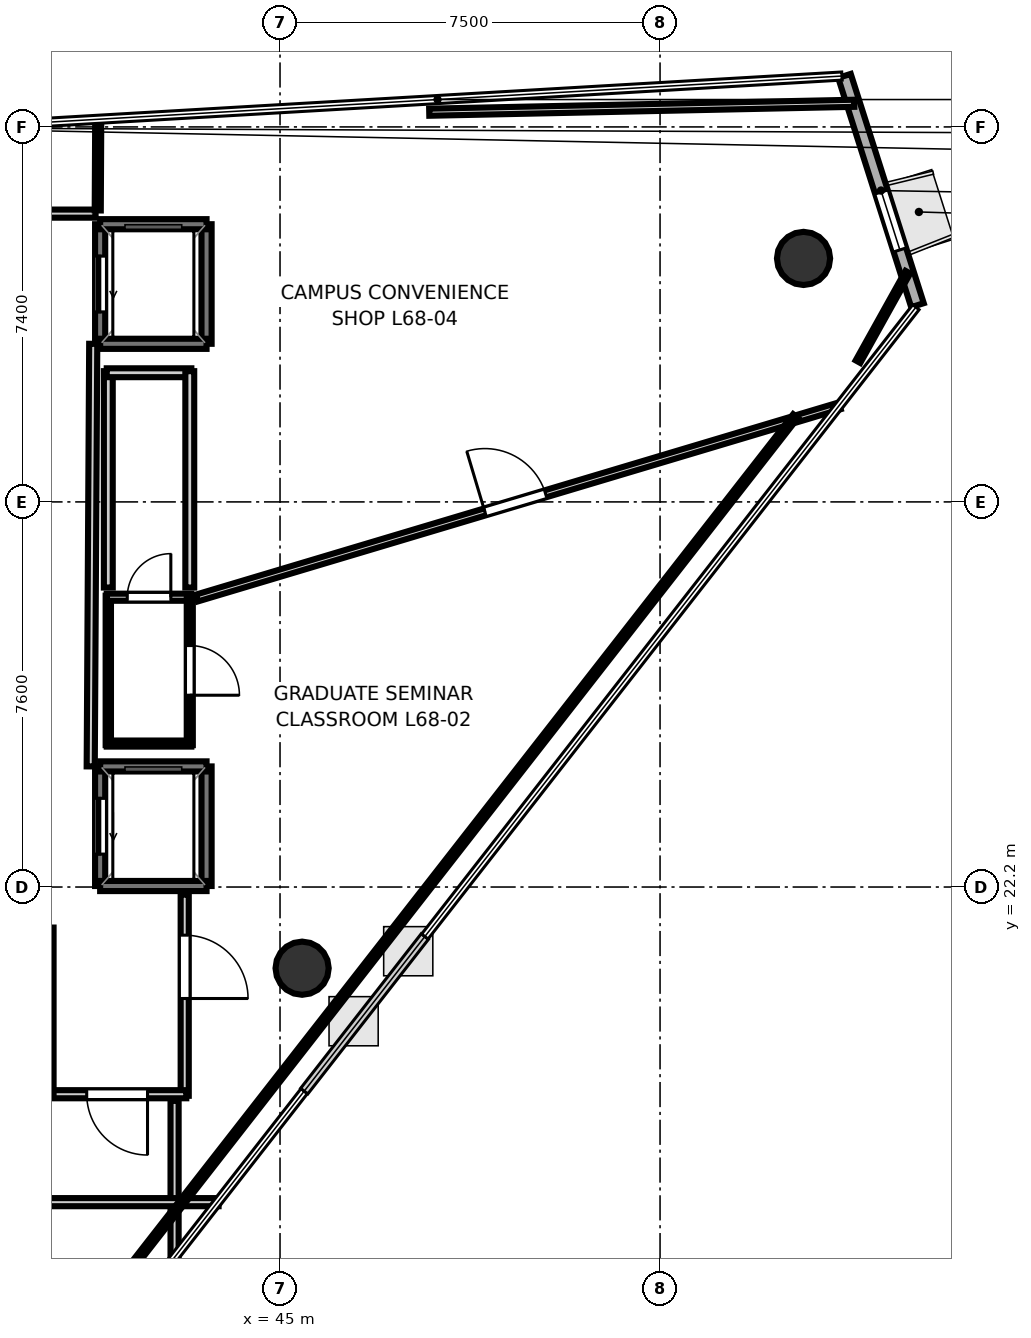
"""IFC4 building model, lengths in metres.
Left out: names, types, materials, properties, quantities, classifications, styles, units other than length and angle.
Written with IfcOpenShell. Run it as: python <this file> out.ifc"""

import sys

from ifc_helpers import new_model, si_unit, direction, frame, frame_2d, origin, origin_2d, place, context, subcontext, project, spatial, rectangle, hollow_circle, extrude, element, fill, save


model = new_model("IFC4")
c1 = context("Model", 3, precision=1e-05, world=origin(), true_north=direction((0.0, 1.0)))
c2 = subcontext(c1, "Body", "Model", "MODEL_VIEW")
j1 = project(units=[si_unit("LENGTHUNIT", "METRE"), si_unit("PLANEANGLEUNIT", "RADIAN")], contexts=[c1])
p1 = place(None, origin())
s1 = spatial("IfcSite", under=j1, at=p1, CompositionType="ELEMENT")
p2 = place(p1, origin())
s2 = spatial("IfcBuilding", under=s1, at=p2, CompositionType="ELEMENT")
p3 = place(p2, frame((0.0, 0.0, 264.9)))
s3 = spatial("IfcBuildingStorey", under=s2, at=p3, CompositionType="ELEMENT", Elevation=264.9)
for number, where, z_axis, x_axis in (
    (1, (55.332, 34.605, 0.0), (0.0, 0.0, 1.0), (1.0, 0.0, 0.0)),
    (2, (45.436, 20.598, 0.0), (0.0, 0.0, 1.0), (1.0, 0.0, 0.0)),
):
    element("IfcColumn", number, at=place(p3, frame(where, z_axis=z_axis, x_axis=x_axis)), inside=s3, PredefinedType="COLUMN", context=c2, shape_type="SweptSolid", body=[
        extrude(hollow_circle(Radius=0.525, WallThickness=0.028, at=origin_2d()), origin(), (0.0, 0.0, 1.0), 3.7),
    ])
p4 = place(p3, frame((57.581, 33.682, 0.0), z_axis=(0.0, 0.0, 1.0), x_axis=(-0.303320364909, 0.952888637896, 0.0)))
e3 = element("IfcWall", 3, at=p4, inside=s3, PredefinedType="SOLIDWALL", context=c2, shape_type="SweptSolid", body=[
    extrude(rectangle(XDim=4.749, YDim=0.26, at=frame_2d((2.375, 0.0))), origin(), (0.0, 0.0, 1.0), 3.52),
])
p5 = place(p4, frame((1.145, 0.0, 0.9)))
e4 = element("IfcOpeningElement", 4, at=p5, cuts=e3, PredefinedType="OPENING", context=c2, shape_type="SweptSolid", body=[
    extrude(rectangle(XDim=1.2, YDim=2.0, at=frame_2d((0.6, 1.0))), frame((0.0, 0.14, 0.0), z_axis=(0.0, -1.0, 0.0), x_axis=(1.0, 0.0, 0.0)), (0.0, 0.0, 1.0), 0.28),
])
p6 = place(p3, frame((43.55, 22.22, 0.0), z_axis=(0.0, 0.0, 1.0), x_axis=(0.0, 1.0, 0.0)))
e5 = element("IfcWall", 5, at=p6, inside=s3, PredefinedType="SOLIDWALL", context=c2, shape_type="SweptSolid", body=[
    extrude(rectangle(XDim=2.36, YDim=0.2, at=frame_2d((1.18, 0.0))), origin(), (0.0, 0.0, 1.0), 3.52),
])
p7 = place(p3, frame((41.45, 22.22, 0.0), z_axis=(0.0, 0.0, 1.0), x_axis=(0.0, 1.0, 0.0)))
e6 = element("IfcWall", 6, at=p7, inside=s3, PredefinedType="SOLIDWALL", context=c2, shape_type="SweptSolid", body=[
    extrude(rectangle(XDim=2.36, YDim=0.2, at=frame_2d((1.18, 0.0))), origin(), (0.0, 0.0, 1.0), 3.52),
])
p8 = place(p7, frame((0.63, 0.0, 0.0)))
e7 = element("IfcOpeningElement", 7, at=p8, cuts=e6, PredefinedType="OPENING", context=c2, shape_type="SweptSolid", body=[
    extrude(rectangle(XDim=1.1, YDim=2.15, at=frame_2d((0.55, 1.075))), frame((0.0, 0.11, 0.0), z_axis=(0.0, -1.0, 0.0), x_axis=(1.0, 0.0, 0.0)), (0.0, 0.0, 1.0), 0.22),
])
for number, where, z_axis, x_axis in (
    (8, (41.45, 24.58, 0.0), (0.0, 0.0, 1.0), (1.0, 0.0, 0.0)),
    (9, (41.45, 22.22, 0.0), (0.0, 0.0, 1.0), (1.0, 0.0, 0.0)),
):
    element("IfcWall", number, at=place(p3, frame(where, z_axis=z_axis, x_axis=x_axis)), inside=s3, PredefinedType="SOLIDWALL", context=c2, shape_type="SweptSolid", body=[
        extrude(rectangle(XDim=2.1, YDim=0.2, at=frame_2d((1.05, 0.0))), origin(), (0.0, 0.0, 1.0), 3.52),
    ])
p9 = place(p3, frame((43.55, 32.92, 0.0), z_axis=(0.0, 0.0, 1.0), x_axis=(0.0, 1.0, 0.0)))
e10 = element("IfcWall", 10, at=p9, inside=s3, PredefinedType="SOLIDWALL", context=c2, shape_type="SweptSolid", body=[
    extrude(rectangle(XDim=2.36, YDim=0.2, at=frame_2d((1.18, 0.0))), origin(), (0.0, 0.0, 1.0), 3.52),
])
p10 = place(p3, frame((41.45, 32.92, 0.0), z_axis=(0.0, 0.0, 1.0), x_axis=(0.0, 1.0, 0.0)))
e11 = element("IfcWall", 11, at=p10, inside=s3, PredefinedType="SOLIDWALL", context=c2, shape_type="SweptSolid", body=[
    extrude(rectangle(XDim=2.36, YDim=0.2, at=frame_2d((1.18, 0.0))), origin(), (0.0, 0.0, 1.0), 3.52),
])
p11 = place(p10, frame((0.63, 0.0, 0.0)))
e12 = element("IfcOpeningElement", 12, at=p11, cuts=e11, PredefinedType="OPENING", context=c2, shape_type="SweptSolid", body=[
    extrude(rectangle(XDim=1.1, YDim=2.15, at=frame_2d((0.55, 1.075))), frame((0.0, 0.11, 0.0), z_axis=(0.0, -1.0, 0.0), x_axis=(1.0, 0.0, 0.0)), (0.0, 0.0, 1.0), 0.22),
])
for number, where, z_axis, x_axis in (
    (13, (41.45, 35.28, 0.0), (0.0, 0.0, 1.0), (1.0, 0.0, 0.0)),
    (14, (41.45, 32.92, 0.0), (0.0, 0.0, 1.0), (1.0, 0.0, 0.0)),
):
    element("IfcWall", number, at=place(p3, frame(where, z_axis=z_axis, x_axis=x_axis)), inside=s3, PredefinedType="SOLIDWALL", context=c2, shape_type="SweptSolid", body=[
        extrude(rectangle(XDim=2.1, YDim=0.2, at=frame_2d((1.05, 0.0))), origin(), (0.0, 0.0, 1.0), 3.52),
    ])
p12 = place(p3, frame((39.88, 35.489, 0.0), z_axis=(0.0, 0.0, 1.0), x_axis=(1.0, 0.0, 0.0)))
e15 = element("IfcWall", 15, at=p12, inside=s3, PredefinedType="PARTITIONING", context=c2, shape_type="SweptSolid", body=[
    extrude(rectangle(XDim=1.48, YDim=0.16, at=frame_2d((0.74, 0.0))), origin(), (0.0, 0.0, 1.0), 2.84),
])
p13 = place(p3, frame((41.313, 32.92, 0.0), z_axis=(0.0, 0.0, 1.0), x_axis=(-0.005942518022, -0.999982343084, 0.0)))
e16 = element("IfcWall", 16, at=p13, inside=s3, PredefinedType="PARTITIONING", context=c2, shape_type="SweptSolid", body=[
    extrude(rectangle(XDim=8.34, YDim=0.16, at=frame_2d((4.17, 0.0))), origin(), (0.0, 0.0, 1.0), 2.84),
])
p14 = place(p3, frame((43.119, 22.05, 0.0), z_axis=(0.0, 0.0, 1.0), x_axis=(0.0, -1.0, 0.0)))
e17 = element("IfcWall", 17, at=p14, inside=s3, PredefinedType="PARTITIONING", context=c2, shape_type="SweptSolid", body=[
    extrude(rectangle(XDim=3.97, YDim=0.16, at=frame_2d((1.985, 0.0))), origin(), (0.0, 0.0, 1.0), 2.84),
])
p15 = place(p14, frame((0.8, 0.0, 0.0)))
e18 = element("IfcOpeningElement", 18, at=p15, cuts=e17, PredefinedType="OPENING", context=c2, shape_type="SweptSolid", body=[
    extrude(rectangle(XDim=1.25, YDim=2.2, at=frame_2d((0.625, 1.1))), frame((0.0, 0.09, 0.0), z_axis=(0.0, -1.0, 0.0), x_axis=(1.0, 0.0, 0.0)), (0.0, 0.0, 1.0), 0.18),
])
p16 = place(p3, frame((43.15, 18.111, 0.0), z_axis=(0.0, 0.0, 1.0), x_axis=(-1.0, 0.0, 0.0)))
e19 = element("IfcWall", 19, at=p16, inside=s3, PredefinedType="PARTITIONING", context=c2, shape_type="SweptSolid", body=[
    extrude(rectangle(XDim=2.73, YDim=0.16, at=frame_2d((1.365, 0.0))), origin(), (0.0, 0.0, 1.0), 2.84),
])
p17 = place(p16, frame((0.765, 0.0, 0.0)))
e20 = element("IfcOpeningElement", 20, at=p17, cuts=e19, PredefinedType="OPENING", context=c2, shape_type="SweptSolid", body=[
    extrude(rectangle(XDim=1.2, YDim=2.15, at=frame_2d((0.6, 1.075))), frame((0.0, 0.09, 0.0), z_axis=(0.0, -1.0, 0.0), x_axis=(1.0, 0.0, 0.0)), (0.0, 0.0, 1.0), 0.18),
])
p18 = place(p3, frame((40.451, 18.08, 0.0), z_axis=(0.0, 0.0, 1.0), x_axis=(0.0, 1.0, 0.0)))
e21 = element("IfcWall", 21, at=p18, inside=s3, PredefinedType="PARTITIONING", context=c2, shape_type="SweptSolid", body=[
    extrude(rectangle(XDim=3.32, YDim=0.16, at=frame_2d((1.66, 0.0))), origin(), (0.0, 0.0, 1.0), 2.84),
])
p19 = place(p3, frame((43.25, 25.031, 0.0), z_axis=(0.0, 0.0, 1.0), x_axis=(-1.0, 0.0, 0.0)))
e22 = element("IfcWall", 22, at=p19, inside=s3, PredefinedType="PARTITIONING", context=c2, shape_type="SweptSolid", body=[
    extrude(rectangle(XDim=1.67, YDim=0.12, at=frame_2d((0.835, 0.0))), origin(), (0.0, 0.0, 1.0), 2.84),
])
p20 = place(p3, frame((41.611, 25.0, 0.0), z_axis=(0.0, 0.0, 1.0), x_axis=(0.0, 1.0, 0.0)))
e23 = element("IfcWall", 23, at=p20, inside=s3, PredefinedType="PARTITIONING", context=c2, shape_type="SweptSolid", body=[
    extrude(rectangle(XDim=2.95, YDim=0.105, at=frame_2d((1.475, 0.0))), origin(), (0.0, 0.0, 1.0), 2.84),
])
p21 = place(p3, frame((41.58, 27.919, 0.0), z_axis=(0.0, 0.0, 1.0), x_axis=(1.0, 0.0, 0.0)))
e24 = element("IfcWall", 24, at=p21, inside=s3, PredefinedType="PARTITIONING", context=c2, shape_type="SweptSolid", body=[
    extrude(rectangle(XDim=1.67, YDim=0.14, at=frame_2d((0.835, 0.0))), origin(), (0.0, 0.0, 1.0), 2.84),
])
p22 = place(p21, frame((0.405, 0.0, 0.0)))
e25 = element("IfcOpeningElement", 25, at=p22, cuts=e24, PredefinedType="OPENING", context=c2, shape_type="SweptSolid", body=[
    extrude(rectangle(XDim=0.86, YDim=2.05, at=frame_2d((0.43, 1.025))), frame((0.0, 0.08, 0.0), z_axis=(0.0, -1.0, 0.0), x_axis=(1.0, 0.0, 0.0)), (0.0, 0.0, 1.0), 0.16),
])
p23 = place(p3, frame((43.219, 27.95, 0.0), z_axis=(0.0, 0.0, 1.0), x_axis=(0.0, -1.0, 0.0)))
e26 = element("IfcWall", 26, at=p23, inside=s3, PredefinedType="PARTITIONING", context=c2, shape_type="SweptSolid", body=[
    extrude(rectangle(XDim=2.95, YDim=0.12, at=frame_2d((1.475, 0.0))), origin(), (0.0, 0.0, 1.0), 2.84),
])
p24 = place(p23, frame((0.985, 0.0, 0.0)))
e27 = element("IfcOpeningElement", 27, at=p24, cuts=e26, PredefinedType="OPENING", context=c2, shape_type="SweptSolid", body=[
    extrude(rectangle(XDim=0.98, YDim=2.1, at=frame_2d((0.49, 1.05))), frame((0.0, 0.07, 0.0), z_axis=(0.0, -1.0, 0.0), x_axis=(1.0, 0.0, 0.0)), (0.0, 0.0, 1.0), 0.14),
])
p25 = place(p3, frame((41.611, 28.11, 0.0), z_axis=(0.0, 0.0, 1.0), x_axis=(0.0, 1.0, 0.0)))
e28 = element("IfcWall", 28, at=p25, inside=s3, PredefinedType="PLUMBINGWALL", context=c2, shape_type="SweptSolid", body=[
    extrude(rectangle(XDim=4.27, YDim=0.175, at=frame_2d((2.135, 0.0))), origin(), (0.0, 0.0, 1.0), 2.84),
])
p26 = place(p3, frame((41.58, 32.349, 0.0), z_axis=(0.0, 0.0, 1.0), x_axis=(1.0, 0.0, 0.0)))
e29 = element("IfcWall", 29, at=p26, inside=s3, PredefinedType="PLUMBINGWALL", context=c2, shape_type="SweptSolid", body=[
    extrude(rectangle(XDim=1.67, YDim=0.175, at=frame_2d((0.835, 0.0))), origin(), (0.0, 0.0, 1.0), 2.84),
])
p27 = place(p3, frame((43.219, 32.38, 0.0), z_axis=(0.0, 0.0, 1.0), x_axis=(0.0, -1.0, 0.0)))
e30 = element("IfcWall", 30, at=p27, inside=s3, PredefinedType="PLUMBINGWALL", context=c2, shape_type="SweptSolid", body=[
    extrude(rectangle(XDim=4.27, YDim=0.175, at=frame_2d((2.135, 0.0))), origin(), (0.0, 0.0, 1.0), 2.84),
])
p28 = place(p3, frame((42.919, 17.98, 0.0), z_axis=(0.0, 0.0, 1.0), x_axis=(0.0, -1.0, 0.0)))
e31 = element("IfcWall", 31, at=p28, inside=s3, PredefinedType="PARTITIONING", context=c2, shape_type="SweptSolid", body=[
    extrude(rectangle(XDim=3.106, YDim=0.16, at=frame_2d((1.553, 0.0))), origin(), (0.0, 0.0, 1.0), 2.84),
])
p29 = place(p3, frame((43.787, 15.981, 0.0), z_axis=(0.0, 0.0, 1.0), x_axis=(-1.0, 0.0, 0.0)))
e32 = element("IfcWall", 32, at=p29, inside=s3, PredefinedType="PARTITIONING", context=c2, shape_type="SweptSolid", body=[
    extrude(rectangle(XDim=15.187, YDim=0.16, at=frame_2d((7.594, 0.0))), origin(), (0.0, 0.0, 1.0), 2.84),
])
p30 = place(p29, frame((8.293, 0.0, 0.0)))
e33 = element("IfcOpeningElement", 33, at=p30, cuts=e32, PredefinedType="OPENING", context=c2, shape_type="SweptSolid", body=[
    extrude(rectangle(XDim=1.25, YDim=2.2, at=frame_2d((0.625, 1.1))), frame((0.0, 0.09, 0.0), z_axis=(0.0, -1.0, 0.0), x_axis=(1.0, 0.0, 0.0)), (0.0, 0.0, 1.0), 0.18),
])
p31 = place(p3, frame((43.359, 27.903, 0.0), z_axis=(0.0, 0.0, 1.0), x_axis=(0.958100890782, 0.286430939464, 0.0)))
e34 = element("IfcWall", 34, at=p31, inside=s3, PredefinedType="PARTITIONING", context=c2, shape_type="SweptSolid", body=[
    extrude(rectangle(XDim=13.241, YDim=0.14, at=frame_2d((6.621, 0.0))), origin(), (0.0, 0.0, 1.0), 2.84),
])
p32 = place(p31, frame((5.933, 0.0, 0.0)))
e35 = element("IfcOpeningElement", 35, at=p32, cuts=e34, PredefinedType="OPENING", context=c2, shape_type="SweptSolid", body=[
    extrude(rectangle(XDim=1.25, YDim=2.2, at=frame_2d((0.625, 1.1))), frame((0.0, 0.08, 0.0), z_axis=(0.0, -1.0, 0.0), x_axis=(1.0, 0.0, 0.0)), (0.0, 0.0, 1.0), 0.16),
])
p33 = place(p3, frame((55.174, 31.494, 0.0), z_axis=(0.0, 0.0, 1.0), x_axis=(-0.615208730104, -0.788364267584, 0.0)))
e36 = element("IfcWall", 36, at=p33, inside=s3, PredefinedType="PARTITIONING", context=c2, shape_type="SweptSolid", body=[
    extrude(rectangle(XDim=26.507, YDim=0.12, at=frame_2d((13.253, 0.0))), origin(), (0.0, 0.0, 1.0), 2.84),
])
p34 = place(p3, frame((41.412, 37.371, 0.0), z_axis=(0.0, 0.0, 1.0), x_axis=(-0.005232720523, -0.999986309224, 0.0)))
e37 = element("IfcWall", 37, at=p34, inside=s3, PredefinedType="PARTITIONING", context=c2, shape_type="SweptSolid", body=[
    extrude(rectangle(XDim=1.82, YDim=0.12, at=frame_2d((0.91, 0.0))), origin(), (0.0, 0.0, 1.0), 2.84),
])
p35 = place(p3, frame((47.945, 37.49, 0.0), z_axis=(0.0, 0.0, 1.0), x_axis=(0.999779265552, 0.021010001738, 0.0)))
e38 = element("IfcWall", 38, at=p35, inside=s3, PredefinedType="PARTITIONING", context=c2, shape_type="SweptSolid", body=[
    extrude(rectangle(XDim=8.39, YDim=0.14, at=frame_2d((4.195, 0.0))), origin(), (0.0, 0.0, 1.0), 2.84),
])
p36 = place(p3, frame((57.39, 34.334, 0.0), z_axis=(0.0, 0.0, 1.0), x_axis=(-0.486667928669, -0.873587046152, 0.0)))
e39 = element("IfcWall", 39, at=p36, inside=s3, PredefinedType="PARTITIONING", context=c2, shape_type="SweptSolid", body=[
    extrude(rectangle(XDim=2.022, YDim=0.105, at=frame_2d((1.011, 0.0))), origin(), (0.0, 0.0, 1.0), 2.84),
])
p37 = place(p8, origin())
e40 = element("IfcDoor", 40, at=p37, inside=s3, OperationType="SLIDING_TO_LEFT", PredefinedType="DOOR", context=c2, shape_type="SweptSolid", body=[
    extrude(rectangle(XDim=1.1, YDim=2.15, at=frame_2d((0.55, 1.075))), frame((0.0, 0.025, 0.0), z_axis=(0.0, -1.0, 0.0), x_axis=(1.0, 0.0, 0.0)), (0.0, 0.0, 1.0), 0.05),
])
fill(e7, e40)
p38 = place(p11, origin())
e41 = element("IfcDoor", 41, at=p38, inside=s3, OperationType="SLIDING_TO_LEFT", PredefinedType="DOOR", context=c2, shape_type="SweptSolid", body=[
    extrude(rectangle(XDim=1.1, YDim=2.15, at=frame_2d((0.55, 1.075))), frame((0.0, 0.025, 0.0), z_axis=(0.0, -1.0, 0.0), x_axis=(1.0, 0.0, 0.0)), (0.0, 0.0, 1.0), 0.05),
])
fill(e12, e41)
p39 = place(p17, origin())
e42 = element("IfcDoor", 42, at=p39, inside=s3, OperationType="SINGLE_SWING_LEFT", PredefinedType="DOOR", context=c2, shape_type="SweptSolid", body=[
    extrude(rectangle(XDim=1.2, YDim=2.15, at=frame_2d((0.6, 1.075))), frame((0.0, 0.025, 0.0), z_axis=(0.0, -1.0, 0.0), x_axis=(1.0, 0.0, 0.0)), (0.0, 0.0, 1.0), 0.05),
])
fill(e20, e42)
p40 = place(p15, origin())
e43 = element("IfcDoor", 43, at=p40, inside=s3, OperationType="SINGLE_SWING_RIGHT", PredefinedType="DOOR", context=c2, shape_type="SweptSolid", body=[
    extrude(rectangle(XDim=1.25, YDim=2.2, at=frame_2d((0.625, 1.1))), frame((0.0, 0.025, 0.0), z_axis=(0.0, -1.0, 0.0), x_axis=(1.0, 0.0, 0.0)), (0.0, 0.0, 1.0), 0.05),
])
fill(e18, e43)
p41 = place(p24, origin())
e44 = element("IfcDoor", 44, at=p41, inside=s3, OperationType="SINGLE_SWING_RIGHT", PredefinedType="DOOR", context=c2, shape_type="SweptSolid", body=[
    extrude(rectangle(XDim=0.98, YDim=2.1, at=frame_2d((0.49, 1.05))), frame((0.0, 0.025, 0.0), z_axis=(0.0, -1.0, 0.0), x_axis=(1.0, 0.0, 0.0)), (0.0, 0.0, 1.0), 0.05),
])
fill(e27, e44)
p42 = place(p32, origin())
e45 = element("IfcDoor", 45, at=p42, inside=s3, OperationType="SINGLE_SWING_LEFT", PredefinedType="DOOR", context=c2, shape_type="SweptSolid", body=[
    extrude(rectangle(XDim=1.25, YDim=2.2, at=frame_2d((0.625, 1.1))), frame((0.0, 0.025, 0.0), z_axis=(0.0, -1.0, 0.0), x_axis=(1.0, 0.0, 0.0)), (0.0, 0.0, 1.0), 0.05),
])
fill(e35, e45)
p43 = place(p22, origin())
e46 = element("IfcDoor", 46, at=p43, inside=s3, OperationType="SINGLE_SWING_RIGHT", PredefinedType="DOOR", context=c2, shape_type="SweptSolid", body=[
    extrude(rectangle(XDim=0.86, YDim=2.05, at=frame_2d((0.43, 1.025))), frame((0.0, 0.025, 0.0), z_axis=(0.0, -1.0, 0.0), x_axis=(1.0, 0.0, 0.0)), (0.0, 0.0, 1.0), 0.05),
])
fill(e25, e46)
p44 = place(p5, origin())
e47 = element("IfcWindow", 47, at=p44, inside=s3, PartitioningType="SINGLE_PANEL", PredefinedType="WINDOW", context=c2, shape_type="SweptSolid", body=[
    extrude(rectangle(XDim=1.2, YDim=2.0, at=frame_2d((0.6, 1.0))), frame((0.0, 0.03, 0.0), z_axis=(0.0, -1.0, 0.0), x_axis=(1.0, 0.0, 0.0)), (0.0, 0.0, 1.0), 0.06),
])
fill(e4, e47)
save(model, sys.argv[1])
